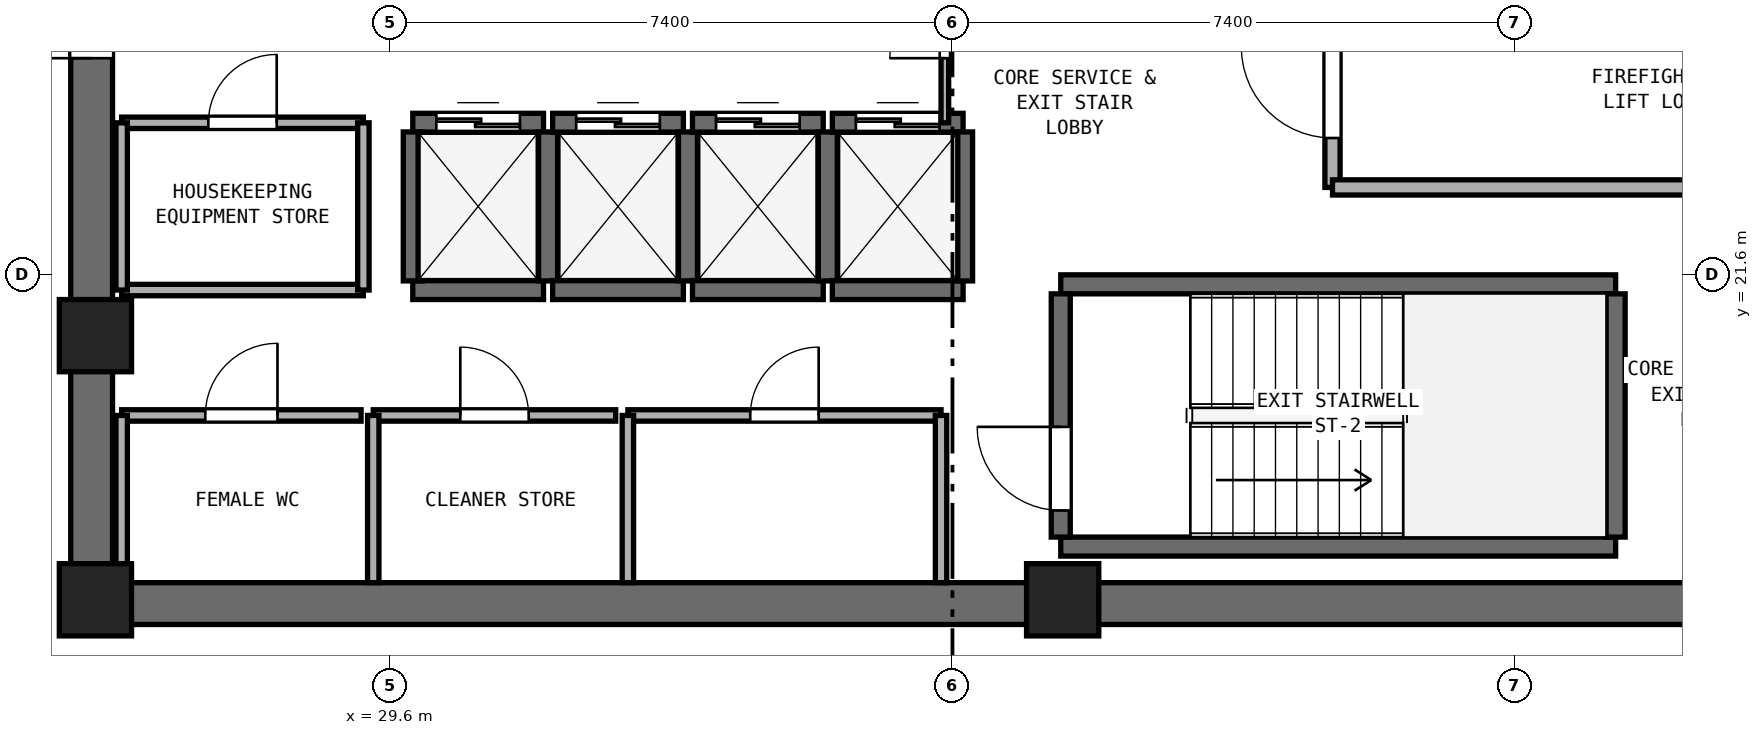
"""IFC4 building model, lengths in metres.
Left out: names, types, materials, properties, quantities, classifications, styles, units other than length and angle.
Written with IfcOpenShell. Run it as: python <this file> out.ifc"""

import sys

from ifc_helpers import new_model, si_unit, direction, frame, frame_2d, origin, origin_2d, place, context, subcontext, project, spatial, rectangle, extrude, element, fill, save


model = new_model("IFC4")
c1 = context("Model", 3, precision=1e-05, world=origin(), true_north=direction((0.0, 1.0)))
c2 = subcontext(c1, "Body", "Model", "MODEL_VIEW")
j1 = project(units=[si_unit("LENGTHUNIT", "METRE"), si_unit("PLANEANGLEUNIT", "RADIAN")], contexts=[c1])
p1 = place(None, origin())
s1 = spatial("IfcSite", under=j1, at=p1, CompositionType="ELEMENT")
p2 = place(p1, origin())
s2 = spatial("IfcBuilding", under=s1, at=p2, CompositionType="ELEMENT")
p3 = place(p2, frame((0.0, 0.0, 163.0)))
s3 = spatial("IfcBuildingStorey", under=s2, at=p3, CompositionType="ELEMENT", Elevation=163.0)
p4 = place(p3, frame((25.4, 17.275, 0.0), z_axis=(0.0, 0.0, 1.0), x_axis=(1.0, 0.0, 0.0)))
e1 = element("IfcWall", 1, at=p4, inside=s3, PredefinedType="SHEAR", context=c2, shape_type="SweptSolid", body=[
    extrude(rectangle(XDim=23.2, YDim=0.55, at=frame_2d((11.6, 0.0))), origin(), (0.0, 0.0, 1.0), 3.54),
])
p5 = place(p3, frame((25.675, 17.55, 0.0), z_axis=(0.0, 0.0, 1.0), x_axis=(0.0, 1.0, 0.0)))
e2 = element("IfcWall", 2, at=p5, inside=s3, PredefinedType="SHEAR", context=c2, shape_type="SweptSolid", body=[
    extrude(rectangle(XDim=15.3, YDim=0.55, at=frame_2d((7.65, 0.0))), origin(), (0.0, 0.0, 1.0), 3.54),
])
p6 = place(p5, frame((6.9, 0.0, 0.0)))
e3 = element("IfcOpeningElement", 3, at=p6, cuts=e2, PredefinedType="OPENING", context=c2, shape_type="SweptSolid", body=[
    extrude(rectangle(XDim=1.5, YDim=2.15, at=frame_2d((0.75, 1.075))), frame((0.0, 0.285, 0.0), z_axis=(0.0, -1.0, 0.0), x_axis=(1.0, 0.0, 0.0)), (0.0, 0.0, 1.0), 0.57),
])
for number, where, z_axis, x_axis in (
    (4, (25.725, 17.325, 0.0), (0.0, 0.0, 1.0), (1.0, 0.0, 0.0)),
    (5, (38.45, 17.325, 0.0), (0.0, 0.0, 1.0), (1.0, 0.0, 0.0)),
    (6, (25.725, 20.8, 0.0), (0.0, 0.0, 1.0), (1.0, 0.0, 0.0)),
):
    element("IfcColumn", number, at=place(p3, frame(where, z_axis=z_axis, x_axis=x_axis)), inside=s3, PredefinedType="PILASTER", context=c2, shape_type="SweptSolid", body=[
        extrude(rectangle(XDim=0.95, YDim=0.95, at=origin_2d()), origin(), (0.0, 0.0, 1.0), 3.8),
    ])
for number, where, z_axis, x_axis in (
    (7, (38.425, 18.025, 0.0), (0.0, 0.0, 1.0), (1.0, 0.0, 0.0)),
    (8, (38.425, 21.475, 0.0), (0.0, 0.0, 1.0), (1.0, 0.0, 0.0)),
):
    element("IfcWall", number, at=place(p3, frame(where, z_axis=z_axis, x_axis=x_axis)), inside=s3, PredefinedType="SHEAR", context=c2, shape_type="SweptSolid", body=[
        extrude(rectangle(XDim=7.3, YDim=0.25, at=frame_2d((3.65, 0.0))), origin(), (0.0, 0.0, 1.0), 3.54),
    ])
p7 = place(p3, frame((38.425, 18.15, 0.0), z_axis=(0.0, 0.0, 1.0), x_axis=(0.0, 1.0, 0.0)))
e9 = element("IfcWall", 9, at=p7, inside=s3, PredefinedType="SHEAR", context=c2, shape_type="SweptSolid", body=[
    extrude(rectangle(XDim=3.2, YDim=0.25, at=frame_2d((1.6, 0.0))), origin(), (0.0, 0.0, 1.0), 3.54),
])
p8 = place(p7, frame((0.35, 0.0, 0.0)))
e10 = element("IfcOpeningElement", 10, at=p8, cuts=e9, PredefinedType="OPENING", context=c2, shape_type="SweptSolid", body=[
    extrude(rectangle(XDim=1.1, YDim=2.15, at=frame_2d((0.55, 1.075))), frame((0.0, 0.135, 0.0), z_axis=(0.0, -1.0, 0.0), x_axis=(1.0, 0.0, 0.0)), (0.0, 0.0, 1.0), 0.27),
])
p9 = place(p3, frame((45.725, 18.15, 0.0), z_axis=(0.0, 0.0, 1.0), x_axis=(0.0, 1.0, 0.0)))
e11 = element("IfcWall", 11, at=p9, inside=s3, PredefinedType="SHEAR", context=c2, shape_type="SweptSolid", body=[
    extrude(rectangle(XDim=3.2, YDim=0.25, at=frame_2d((1.6, 0.0))), origin(), (0.0, 0.0, 1.0), 3.54),
])
p10 = place(p3, frame((29.9, 21.4, 0.0), z_axis=(0.0, 0.0, 1.0), x_axis=(1.0, 0.0, 0.0)))
e12 = element("IfcWall", 12, at=p10, inside=s3, PredefinedType="SHEAR", context=c2, shape_type="SweptSolid", body=[
    extrude(rectangle(XDim=1.72, YDim=0.25, at=frame_2d((0.86, 0.0))), origin(), (0.0, 0.0, 1.0), 3.54),
])
p11 = place(p3, frame((29.9, 23.6, 0.0), z_axis=(0.0, 0.0, 1.0), x_axis=(1.0, 0.0, 0.0)))
e13 = element("IfcWall", 13, at=p11, inside=s3, PredefinedType="SHEAR", context=c2, shape_type="SweptSolid", body=[
    extrude(rectangle(XDim=1.72, YDim=0.25, at=frame_2d((0.86, 0.0))), origin(), (0.0, 0.0, 1.0), 3.54),
])
p12 = place(p11, frame((0.31, 0.0, 0.0)))
e14 = element("IfcOpeningElement", 14, at=p12, cuts=e13, PredefinedType="OPENING", context=c2, shape_type="SweptSolid", body=[
    extrude(rectangle(XDim=1.1, YDim=2.15, at=frame_2d((0.55, 1.075))), frame((0.0, 0.135, 0.0), z_axis=(0.0, -1.0, 0.0), x_axis=(1.0, 0.0, 0.0)), (0.0, 0.0, 1.0), 0.27),
])
for number, where, z_axis, x_axis in (
    (15, (29.9, 21.52, 0.0), (0.0, 0.0, 1.0), (0.0, 1.0, 0.0)),
    (16, (31.68, 21.52, 0.0), (0.0, 0.0, 1.0), (0.0, 1.0, 0.0)),
):
    element("IfcWall", number, at=place(p3, frame(where, z_axis=z_axis, x_axis=x_axis)), inside=s3, PredefinedType="SHEAR", context=c2, shape_type="SweptSolid", body=[
        extrude(rectangle(XDim=1.96, YDim=0.25, at=frame_2d((0.98, 0.0))), origin(), (0.0, 0.0, 1.0), 3.54),
    ])
p13 = place(p3, frame((31.74, 21.4, 0.0), z_axis=(0.0, 0.0, 1.0), x_axis=(1.0, 0.0, 0.0)))
e17 = element("IfcWall", 17, at=p13, inside=s3, PredefinedType="SHEAR", context=c2, shape_type="SweptSolid", body=[
    extrude(rectangle(XDim=1.72, YDim=0.25, at=frame_2d((0.86, 0.0))), origin(), (0.0, 0.0, 1.0), 3.54),
])
p14 = place(p3, frame((31.74, 23.6, 0.0), z_axis=(0.0, 0.0, 1.0), x_axis=(1.0, 0.0, 0.0)))
e18 = element("IfcWall", 18, at=p14, inside=s3, PredefinedType="SHEAR", context=c2, shape_type="SweptSolid", body=[
    extrude(rectangle(XDim=1.72, YDim=0.25, at=frame_2d((0.86, 0.0))), origin(), (0.0, 0.0, 1.0), 3.54),
])
p15 = place(p14, frame((0.31, 0.0, 0.0)))
e19 = element("IfcOpeningElement", 19, at=p15, cuts=e18, PredefinedType="OPENING", context=c2, shape_type="SweptSolid", body=[
    extrude(rectangle(XDim=1.1, YDim=2.15, at=frame_2d((0.55, 1.075))), frame((0.0, 0.135, 0.0), z_axis=(0.0, -1.0, 0.0), x_axis=(1.0, 0.0, 0.0)), (0.0, 0.0, 1.0), 0.27),
])
p16 = place(p3, frame((33.52, 21.52, 0.0), z_axis=(0.0, 0.0, 1.0), x_axis=(0.0, 1.0, 0.0)))
e20 = element("IfcWall", 20, at=p16, inside=s3, PredefinedType="SHEAR", context=c2, shape_type="SweptSolid", body=[
    extrude(rectangle(XDim=1.96, YDim=0.25, at=frame_2d((0.98, 0.0))), origin(), (0.0, 0.0, 1.0), 3.54),
])
p17 = place(p3, frame((33.58, 21.4, 0.0), z_axis=(0.0, 0.0, 1.0), x_axis=(1.0, 0.0, 0.0)))
e21 = element("IfcWall", 21, at=p17, inside=s3, PredefinedType="SHEAR", context=c2, shape_type="SweptSolid", body=[
    extrude(rectangle(XDim=1.72, YDim=0.25, at=frame_2d((0.86, 0.0))), origin(), (0.0, 0.0, 1.0), 3.54),
])
p18 = place(p3, frame((33.58, 23.6, 0.0), z_axis=(0.0, 0.0, 1.0), x_axis=(1.0, 0.0, 0.0)))
e22 = element("IfcWall", 22, at=p18, inside=s3, PredefinedType="SHEAR", context=c2, shape_type="SweptSolid", body=[
    extrude(rectangle(XDim=1.72, YDim=0.25, at=frame_2d((0.86, 0.0))), origin(), (0.0, 0.0, 1.0), 3.54),
])
p19 = place(p18, frame((0.31, 0.0, 0.0)))
e23 = element("IfcOpeningElement", 23, at=p19, cuts=e22, PredefinedType="OPENING", context=c2, shape_type="SweptSolid", body=[
    extrude(rectangle(XDim=1.1, YDim=2.15, at=frame_2d((0.55, 1.075))), frame((0.0, 0.135, 0.0), z_axis=(0.0, -1.0, 0.0), x_axis=(1.0, 0.0, 0.0)), (0.0, 0.0, 1.0), 0.27),
])
p20 = place(p3, frame((35.36, 21.52, 0.0), z_axis=(0.0, 0.0, 1.0), x_axis=(0.0, 1.0, 0.0)))
e24 = element("IfcWall", 24, at=p20, inside=s3, PredefinedType="SHEAR", context=c2, shape_type="SweptSolid", body=[
    extrude(rectangle(XDim=1.96, YDim=0.25, at=frame_2d((0.98, 0.0))), origin(), (0.0, 0.0, 1.0), 3.54),
])
p21 = place(p3, frame((35.42, 21.4, 0.0), z_axis=(0.0, 0.0, 1.0), x_axis=(1.0, 0.0, 0.0)))
e25 = element("IfcWall", 25, at=p21, inside=s3, PredefinedType="SHEAR", context=c2, shape_type="SweptSolid", body=[
    extrude(rectangle(XDim=1.72, YDim=0.25, at=frame_2d((0.86, 0.0))), origin(), (0.0, 0.0, 1.0), 3.54),
])
p22 = place(p3, frame((35.42, 23.6, 0.0), z_axis=(0.0, 0.0, 1.0), x_axis=(1.0, 0.0, 0.0)))
e26 = element("IfcWall", 26, at=p22, inside=s3, PredefinedType="SHEAR", context=c2, shape_type="SweptSolid", body=[
    extrude(rectangle(XDim=1.72, YDim=0.25, at=frame_2d((0.86, 0.0))), origin(), (0.0, 0.0, 1.0), 3.54),
])
p23 = place(p22, frame((0.31, 0.0, 0.0)))
e27 = element("IfcOpeningElement", 27, at=p23, cuts=e26, PredefinedType="OPENING", context=c2, shape_type="SweptSolid", body=[
    extrude(rectangle(XDim=1.1, YDim=2.15, at=frame_2d((0.55, 1.075))), frame((0.0, 0.135, 0.0), z_axis=(0.0, -1.0, 0.0), x_axis=(1.0, 0.0, 0.0)), (0.0, 0.0, 1.0), 0.27),
])
p24 = place(p3, frame((37.14, 21.52, 0.0), z_axis=(0.0, 0.0, 1.0), x_axis=(0.0, 1.0, 0.0)))
e28 = element("IfcWall", 28, at=p24, inside=s3, PredefinedType="SHEAR", context=c2, shape_type="SweptSolid", body=[
    extrude(rectangle(XDim=1.96, YDim=0.25, at=frame_2d((0.98, 0.0))), origin(), (0.0, 0.0, 1.0), 3.54),
])
p25 = place(p3, frame((42.0, 22.75, 0.0), z_axis=(0.0, 0.0, 1.0), x_axis=(0.0, 1.0, 0.0)))
e29 = element("IfcWall", 29, at=p25, inside=s3, PredefinedType="SOLIDWALL", context=c2, shape_type="SweptSolid", body=[
    extrude(rectangle(XDim=6.05, YDim=0.2, at=frame_2d((3.025, 0.0))), origin(), (0.0, 0.0, 1.0), 3.54),
])
p26 = place(p25, frame((0.65, 0.0, 0.0)))
e30 = element("IfcOpeningElement", 30, at=p26, cuts=e29, PredefinedType="OPENING", context=c2, shape_type="SweptSolid", body=[
    extrude(rectangle(XDim=1.2, YDim=2.15, at=frame_2d((0.6, 1.075))), frame((0.0, 0.11, 0.0), z_axis=(0.0, -1.0, 0.0), x_axis=(1.0, 0.0, 0.0)), (0.0, 0.0, 1.0), 0.22),
])
p27 = place(p3, frame((42.0, 22.75, 0.0), z_axis=(0.0, 0.0, 1.0), x_axis=(1.0, 0.0, 0.0)))
e31 = element("IfcWall", 31, at=p27, inside=s3, PredefinedType="SOLIDWALL", context=c2, shape_type="SweptSolid", body=[
    extrude(rectangle(XDim=6.05, YDim=0.2, at=frame_2d((3.025, 0.0))), origin(), (0.0, 0.0, 1.0), 3.54),
])
p28 = place(p3, frame((26.07, 19.75, 0.0), z_axis=(0.0, 0.0, 1.0), x_axis=(1.0, 0.0, 0.0)))
e32 = element("IfcWall", 32, at=p28, inside=s3, PredefinedType="PARTITIONING", context=c2, shape_type="SweptSolid", body=[
    extrude(rectangle(XDim=3.15, YDim=0.15, at=frame_2d((1.575, 0.0))), origin(), (0.0, 0.0, 1.0), 3.54),
])
p29 = place(p28, frame((1.1, 0.0, 0.0)))
e33 = element("IfcOpeningElement", 33, at=p29, cuts=e32, PredefinedType="OPENING", context=c2, shape_type="SweptSolid", body=[
    extrude(rectangle(XDim=0.95, YDim=2.1, at=frame_2d((0.475, 1.05))), frame((0.0, 0.085, 0.0), z_axis=(0.0, -1.0, 0.0), x_axis=(1.0, 0.0, 0.0)), (0.0, 0.0, 1.0), 0.17),
])
p30 = place(p3, frame((26.07, 17.55, 0.0), z_axis=(0.0, 0.0, 1.0), x_axis=(0.0, 1.0, 0.0)))
e34 = element("IfcWall", 34, at=p30, inside=s3, PredefinedType="PARTITIONING", context=c2, shape_type="SweptSolid", body=[
    extrude(rectangle(XDim=2.2, YDim=0.15, at=frame_2d((1.1, 0.0))), origin(), (0.0, 0.0, 1.0), 2.64),
])
p31 = place(p3, frame((29.38, 19.75, 0.0), z_axis=(0.0, 0.0, 1.0), x_axis=(1.0, 0.0, 0.0)))
e35 = element("IfcWall", 35, at=p31, inside=s3, PredefinedType="PARTITIONING", context=c2, shape_type="SweptSolid", body=[
    extrude(rectangle(XDim=3.19, YDim=0.15, at=frame_2d((1.595, 0.0))), origin(), (0.0, 0.0, 1.0), 3.54),
])
p32 = place(p31, frame((1.145, 0.0, 0.0)))
e36 = element("IfcOpeningElement", 36, at=p32, cuts=e35, PredefinedType="OPENING", context=c2, shape_type="SweptSolid", body=[
    extrude(rectangle(XDim=0.9, YDim=2.1, at=frame_2d((0.45, 1.05))), frame((0.0, 0.085, 0.0), z_axis=(0.0, -1.0, 0.0), x_axis=(1.0, 0.0, 0.0)), (0.0, 0.0, 1.0), 0.17),
])
p33 = place(p3, frame((29.38, 17.55, 0.0), z_axis=(0.0, 0.0, 1.0), x_axis=(0.0, 1.0, 0.0)))
e37 = element("IfcWall", 37, at=p33, inside=s3, PredefinedType="PARTITIONING", context=c2, shape_type="SweptSolid", body=[
    extrude(rectangle(XDim=2.2, YDim=0.15, at=frame_2d((1.1, 0.0))), origin(), (0.0, 0.0, 1.0), 3.54),
])
p34 = place(p3, frame((32.73, 19.75, 0.0), z_axis=(0.0, 0.0, 1.0), x_axis=(1.0, 0.0, 0.0)))
e38 = element("IfcWall", 38, at=p34, inside=s3, PredefinedType="PARTITIONING", context=c2, shape_type="SweptSolid", body=[
    extrude(rectangle(XDim=4.12, YDim=0.15, at=frame_2d((2.06, 0.0))), origin(), (0.0, 0.0, 1.0), 3.54),
])
p35 = place(p34, frame((1.61, 0.0, 0.0)))
e39 = element("IfcOpeningElement", 39, at=p35, cuts=e38, PredefinedType="OPENING", context=c2, shape_type="SweptSolid", body=[
    extrude(rectangle(XDim=0.9, YDim=2.1, at=frame_2d((0.45, 1.05))), frame((0.0, 0.085, 0.0), z_axis=(0.0, -1.0, 0.0), x_axis=(1.0, 0.0, 0.0)), (0.0, 0.0, 1.0), 0.17),
])
for number, where, z_axis, x_axis in (
    (40, (32.73, 17.55, 0.0), (0.0, 0.0, 1.0), (0.0, 1.0, 0.0)),
    (41, (36.85, 17.55, 0.0), (0.0, 0.0, 1.0), (0.0, 1.0, 0.0)),
):
    element("IfcWall", number, at=place(p3, frame(where, z_axis=z_axis, x_axis=x_axis)), inside=s3, PredefinedType="PARTITIONING", context=c2, shape_type="SweptSolid", body=[
        extrude(rectangle(XDim=2.2, YDim=0.15, at=frame_2d((1.1, 0.0))), origin(), (0.0, 0.0, 1.0), 3.54),
    ])
p36 = place(p3, frame((26.07, 21.4, 0.0), z_axis=(0.0, 0.0, 1.0), x_axis=(1.0, 0.0, 0.0)))
e42 = element("IfcWall", 42, at=p36, inside=s3, PredefinedType="PARTITIONING", context=c2, shape_type="SweptSolid", body=[
    extrude(rectangle(XDim=3.18, YDim=0.15, at=frame_2d((1.59, 0.0))), origin(), (0.0, 0.0, 1.0), 3.54),
])
p37 = place(p3, frame((26.07, 23.6, 0.0), z_axis=(0.0, 0.0, 1.0), x_axis=(1.0, 0.0, 0.0)))
e43 = element("IfcWall", 43, at=p37, inside=s3, PredefinedType="PARTITIONING", context=c2, shape_type="SweptSolid", body=[
    extrude(rectangle(XDim=3.18, YDim=0.15, at=frame_2d((1.59, 0.0))), origin(), (0.0, 0.0, 1.0), 3.54),
])
p38 = place(p37, frame((1.14, 0.0, 0.0)))
e44 = element("IfcOpeningElement", 44, at=p38, cuts=e43, PredefinedType="OPENING", context=c2, shape_type="SweptSolid", body=[
    extrude(rectangle(XDim=0.9, YDim=2.1, at=frame_2d((0.45, 1.05))), frame((0.0, 0.085, 0.0), z_axis=(0.0, -1.0, 0.0), x_axis=(1.0, 0.0, 0.0)), (0.0, 0.0, 1.0), 0.17),
])
p39 = place(p3, frame((26.07, 21.4, 0.0), z_axis=(0.0, 0.0, 1.0), x_axis=(0.0, 1.0, 0.0)))
e45 = element("IfcWall", 45, at=p39, inside=s3, PredefinedType="PARTITIONING", context=c2, shape_type="SweptSolid", body=[
    extrude(rectangle(XDim=2.2, YDim=0.15, at=frame_2d((1.1, 0.0))), origin(), (0.0, 0.0, 1.0), 2.64),
])
p40 = place(p3, frame((29.25, 21.4, 0.0), z_axis=(0.0, 0.0, 1.0), x_axis=(0.0, 1.0, 0.0)))
e46 = element("IfcWall", 46, at=p40, inside=s3, PredefinedType="PARTITIONING", context=c2, shape_type="SweptSolid", body=[
    extrude(rectangle(XDim=2.2, YDim=0.15, at=frame_2d((1.1, 0.0))), origin(), (0.0, 0.0, 1.0), 3.54),
])
p41 = place(p3, frame((36.9, 23.6, 0.0), z_axis=(0.0, 0.0, 1.0), x_axis=(0.0, 1.0, 0.0)))
e47 = element("IfcWall", 47, at=p41, inside=s3, PredefinedType="PARTITIONING", context=c2, shape_type="SweptSolid", body=[
    extrude(rectangle(XDim=3.2, YDim=0.1, at=frame_2d((1.6, 0.0))), origin(), (0.0, 0.0, 1.0), 3.54),
])
p42 = place(p41, frame((0.85, 0.0, 0.0)))
e48 = element("IfcOpeningElement", 48, at=p42, cuts=e47, PredefinedType="OPENING", context=c2, shape_type="SweptSolid", body=[
    extrude(rectangle(XDim=1.45, YDim=2.12, at=frame_2d((0.725, 1.06))), frame((0.0, 0.06, 0.0), z_axis=(0.0, -1.0, 0.0), x_axis=(1.0, 0.0, 0.0)), (0.0, 0.0, 1.0), 0.12),
])
p43 = place(p8, origin())
e49 = element("IfcDoor", 49, at=p43, inside=s3, OperationType="SINGLE_SWING_RIGHT", PredefinedType="DOOR", context=c2, shape_type="SweptSolid", body=[
    extrude(rectangle(XDim=1.1, YDim=2.15, at=frame_2d((0.55, 1.075))), frame((0.0, 0.025, 0.0), z_axis=(0.0, -1.0, 0.0), x_axis=(1.0, 0.0, 0.0)), (0.0, 0.0, 1.0), 0.05),
])
fill(e10, e49)
p44 = place(p12, origin())
e50 = element("IfcDoor", 50, at=p44, inside=s3, OperationType="DOUBLE_DOOR_SLIDING", PredefinedType="DOOR", context=c2, shape_type="SweptSolid", body=[
    extrude(rectangle(XDim=1.1, YDim=2.15, at=frame_2d((0.55, 1.075))), frame((0.0, 0.025, 0.0), z_axis=(0.0, -1.0, 0.0), x_axis=(1.0, 0.0, 0.0)), (0.0, 0.0, 1.0), 0.05),
])
fill(e14, e50)
p45 = place(p15, origin())
e51 = element("IfcDoor", 51, at=p45, inside=s3, OperationType="DOUBLE_DOOR_SLIDING", PredefinedType="DOOR", context=c2, shape_type="SweptSolid", body=[
    extrude(rectangle(XDim=1.1, YDim=2.15, at=frame_2d((0.55, 1.075))), frame((0.0, 0.025, 0.0), z_axis=(0.0, -1.0, 0.0), x_axis=(1.0, 0.0, 0.0)), (0.0, 0.0, 1.0), 0.05),
])
fill(e19, e51)
p46 = place(p19, origin())
e52 = element("IfcDoor", 52, at=p46, inside=s3, OperationType="DOUBLE_DOOR_SLIDING", PredefinedType="DOOR", context=c2, shape_type="SweptSolid", body=[
    extrude(rectangle(XDim=1.1, YDim=2.15, at=frame_2d((0.55, 1.075))), frame((0.0, 0.025, 0.0), z_axis=(0.0, -1.0, 0.0), x_axis=(1.0, 0.0, 0.0)), (0.0, 0.0, 1.0), 0.05),
])
fill(e23, e52)
p47 = place(p23, origin())
e53 = element("IfcDoor", 53, at=p47, inside=s3, OperationType="DOUBLE_DOOR_SLIDING", PredefinedType="DOOR", context=c2, shape_type="SweptSolid", body=[
    extrude(rectangle(XDim=1.1, YDim=2.15, at=frame_2d((0.55, 1.075))), frame((0.0, 0.025, 0.0), z_axis=(0.0, -1.0, 0.0), x_axis=(1.0, 0.0, 0.0)), (0.0, 0.0, 1.0), 0.05),
])
fill(e27, e53)
p48 = place(p26, origin())
e54 = element("IfcDoor", 54, at=p48, inside=s3, OperationType="SINGLE_SWING_RIGHT", PredefinedType="DOOR", context=c2, shape_type="SweptSolid", body=[
    extrude(rectangle(XDim=1.2, YDim=2.15, at=frame_2d((0.6, 1.075))), frame((0.0, 0.025, 0.0), z_axis=(0.0, -1.0, 0.0), x_axis=(1.0, 0.0, 0.0)), (0.0, 0.0, 1.0), 0.05),
])
fill(e30, e54)
p49 = place(p6, origin())
e55 = element("IfcDoor", 55, at=p49, inside=s3, OperationType="DOUBLE_DOOR_SINGLE_SWING", PredefinedType="DOOR", context=c2, shape_type="SweptSolid", body=[
    extrude(rectangle(XDim=1.5, YDim=2.15, at=frame_2d((0.75, 1.075))), frame((0.0, 0.025, 0.0), z_axis=(0.0, -1.0, 0.0), x_axis=(1.0, 0.0, 0.0)), (0.0, 0.0, 1.0), 0.05),
])
fill(e3, e55)
p50 = place(p29, origin())
e56 = element("IfcDoor", 56, at=p50, inside=s3, OperationType="SINGLE_SWING_RIGHT", PredefinedType="DOOR", context=c2, shape_type="SweptSolid", body=[
    extrude(rectangle(XDim=0.95, YDim=2.1, at=frame_2d((0.475, 1.05))), frame((0.0, 0.025, 0.0), z_axis=(0.0, -1.0, 0.0), x_axis=(1.0, 0.0, 0.0)), (0.0, 0.0, 1.0), 0.05),
])
fill(e33, e56)
p51 = place(p32, origin())
e57 = element("IfcDoor", 57, at=p51, inside=s3, OperationType="SINGLE_SWING_LEFT", PredefinedType="DOOR", context=c2, shape_type="SweptSolid", body=[
    extrude(rectangle(XDim=0.9, YDim=2.1, at=frame_2d((0.45, 1.05))), frame((0.0, 0.025, 0.0), z_axis=(0.0, -1.0, 0.0), x_axis=(1.0, 0.0, 0.0)), (0.0, 0.0, 1.0), 0.05),
])
fill(e36, e57)
p52 = place(p35, origin())
e58 = element("IfcDoor", 58, at=p52, inside=s3, OperationType="SINGLE_SWING_RIGHT", PredefinedType="DOOR", context=c2, shape_type="SweptSolid", body=[
    extrude(rectangle(XDim=0.9, YDim=2.1, at=frame_2d((0.45, 1.05))), frame((0.0, 0.025, 0.0), z_axis=(0.0, -1.0, 0.0), x_axis=(1.0, 0.0, 0.0)), (0.0, 0.0, 1.0), 0.05),
])
fill(e39, e58)
p53 = place(p38, origin())
e59 = element("IfcDoor", 59, at=p53, inside=s3, OperationType="SINGLE_SWING_RIGHT", PredefinedType="DOOR", context=c2, shape_type="SweptSolid", body=[
    extrude(rectangle(XDim=0.9, YDim=2.1, at=frame_2d((0.45, 1.05))), frame((0.0, 0.025, 0.0), z_axis=(0.0, -1.0, 0.0), x_axis=(1.0, 0.0, 0.0)), (0.0, 0.0, 1.0), 0.05),
])
fill(e44, e59)
p54 = place(p42, origin())
e60 = element("IfcDoor", 60, at=p54, inside=s3, OperationType="DOUBLE_DOOR_SINGLE_SWING", PredefinedType="DOOR", context=c2, shape_type="SweptSolid", body=[
    extrude(rectangle(XDim=1.45, YDim=2.12, at=frame_2d((0.725, 1.06))), frame((0.0, 0.025, 0.0), z_axis=(0.0, -1.0, 0.0), x_axis=(1.0, 0.0, 0.0)), (0.0, 0.0, 1.0), 0.05),
])
fill(e48, e60)
save(model, sys.argv[1])
